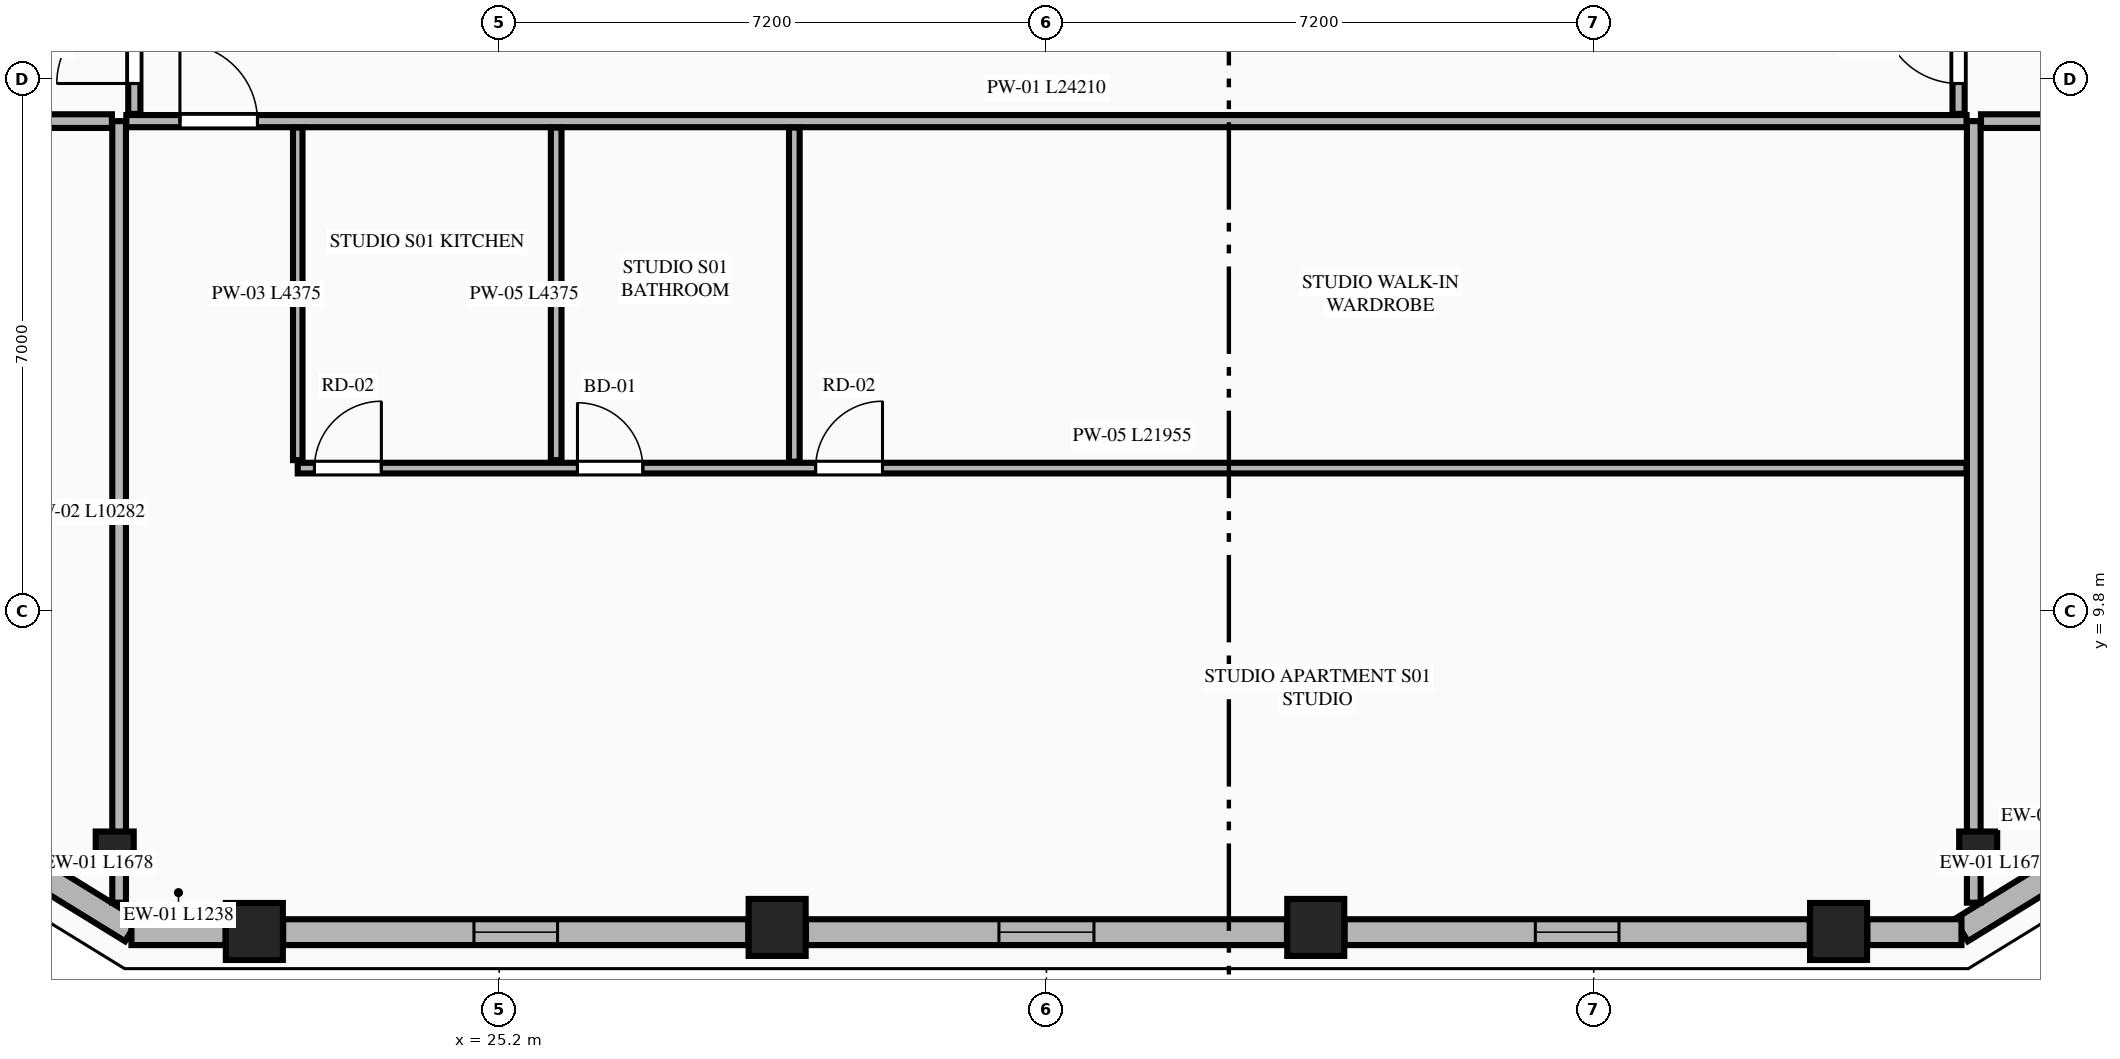
"""IFC4 building model, lengths in metres.
Left out: names, types, materials, properties, quantities, classifications, styles, units other than length and angle.
Written with IfcOpenShell. Run it as: python <this file> out.ifc"""

import sys

from ifc_helpers import new_model, si_unit, direction, frame, frame_2d, origin, origin_2d, place, context, subcontext, project, spatial, rectangle, extrude, element, fill, save


model = new_model("IFC4")
c1 = context("Model", 3, precision=1e-05, world=origin(), true_north=direction((0.0, 1.0)))
c2 = subcontext(c1, "Body", "Model", "MODEL_VIEW")
j1 = project(units=[si_unit("LENGTHUNIT", "METRE"), si_unit("PLANEANGLEUNIT", "RADIAN")], contexts=[c1])
p1 = place(None, origin())
s1 = spatial("IfcSite", under=j1, at=p1, CompositionType="ELEMENT")
p2 = place(p1, origin())
s2 = spatial("IfcBuilding", under=s1, at=p2, CompositionType="ELEMENT")
p3 = place(p2, frame((0.0, 0.0, 214.5)))
s3 = spatial("IfcBuildingStorey", under=s2, at=p3, CompositionType="ELEMENT", Elevation=214.5)
for number, where, z_axis, x_axis in (
    (1, (21.979, 5.589, 0.0), (0.0, 0.0, 1.0), (1.0, 0.0, 0.0)),
    (2, (28.857, 5.642, 0.0), (0.0, 0.0, 1.0), (1.0, 0.0, 0.0)),
    (3, (35.943, 5.642, 0.0), (0.0, 0.0, 1.0), (1.0, 0.0, 0.0)),
    (4, (42.821, 5.589, 0.0), (0.0, 0.0, 1.0), (1.0, 0.0, 0.0)),
):
    element("IfcColumn", number, at=place(p3, frame(where, z_axis=z_axis, x_axis=x_axis)), inside=s3, PredefinedType="COLUMN", context=c2, shape_type="SweptSolid", body=[
        extrude(rectangle(XDim=0.75, YDim=0.75, at=origin_2d()), origin(), (0.0, 0.0, 1.0), 3.55),
    ])
for number, where, z_axis, x_axis in (
    (5, (20.142, 6.654, 0.0), (0.0, 0.0, 1.0), (0.865, -0.501, 0.0)),
    (6, (44.658, 6.654, 0.0), (0.0, 0.0, 1.0), (0.865, 0.501, 0.0)),
):
    element("IfcColumn", number, at=place(p3, frame(where, z_axis=z_axis, x_axis=x_axis)), inside=s3, PredefinedType="PILASTER", context=c2, shape_type="SweptSolid", body=[
        extrude(rectangle(XDim=0.5, YDim=0.35, at=origin_2d()), origin(), (0.0, 0.0, 1.0), 3.55),
    ])
for number, where, z_axis, x_axis in (
    (7, (18.938, 6.484, 0.0), (0.0, 0.0, 1.0), (0.852, -0.524, 0.0)),
    (8, (44.433, 5.605, 0.0), (0.0, 0.0, 1.0), (0.852, 0.524, 0.0)),
):
    element("IfcWall", number, at=place(p3, frame(where, z_axis=z_axis, x_axis=x_axis)), inside=s3, PredefinedType="STANDARD", context=c2, shape_type="SweptSolid", body=[
        extrude(rectangle(XDim=1.678, YDim=0.34, at=frame_2d((0.839, 0.0))), origin(), (0.0, 0.0, 1.0), 3.35),
    ])
p4 = place(p3, frame((20.362, 5.58, 0.0), z_axis=(0.0, 0.0, 1.0), x_axis=(1.0, 0.0, 0.0)))
e9 = element("IfcWall", 9, at=p4, inside=s3, PredefinedType="STANDARD", context=c2, shape_type="SweptSolid", body=[
    extrude(rectangle(XDim=1.238, YDim=0.34, at=frame_2d((0.619, 0.0))), origin(), (0.0, 0.0, 1.0), 3.35),
])
p5 = place(p3, frame((22.358, 5.58, 0.0), z_axis=(0.0, 0.0, 1.0), x_axis=(1.0, 0.0, 0.0)))
e10 = element("IfcWall", 10, at=p5, inside=s3, PredefinedType="STANDARD", context=c2, shape_type="SweptSolid", body=[
    extrude(rectangle(XDim=6.12, YDim=0.34, at=frame_2d((3.06, 0.0))), origin(), (0.0, 0.0, 1.0), 2.883),
])
p6 = place(p5, frame((2.51, 0.0, 0.75)))
e11 = element("IfcOpeningElement", 11, at=p6, cuts=e10, PredefinedType="OPENING", context=c2, shape_type="SweptSolid", body=[
    extrude(rectangle(XDim=1.1, YDim=1.983, at=frame_2d((0.55, 0.991))), frame((0.0, 0.18, 0.0), z_axis=(0.0, -1.0, 0.0), x_axis=(1.0, 0.0, 0.0)), (0.0, 0.0, 1.0), 0.36),
])
p7 = place(p3, frame((29.236, 5.58, 0.0), z_axis=(0.0, 0.0, 1.0), x_axis=(1.0, 0.0, 0.0)))
e12 = element("IfcWall", 12, at=p7, inside=s3, PredefinedType="STANDARD", context=c2, shape_type="SweptSolid", body=[
    extrude(rectangle(XDim=6.328, YDim=0.34, at=frame_2d((3.164, 0.0))), origin(), (0.0, 0.0, 1.0), 2.883),
])
p8 = place(p7, frame((2.539, 0.0, 0.75)))
e13 = element("IfcOpeningElement", 13, at=p8, cuts=e12, PredefinedType="OPENING", context=c2, shape_type="SweptSolid", body=[
    extrude(rectangle(XDim=1.25, YDim=1.95, at=frame_2d((0.625, 0.975))), frame((0.0, 0.18, 0.0), z_axis=(0.0, -1.0, 0.0), x_axis=(1.0, 0.0, 0.0)), (0.0, 0.0, 1.0), 0.36),
])
p9 = place(p3, frame((36.322, 5.58, 0.0), z_axis=(0.0, 0.0, 1.0), x_axis=(1.0, 0.0, 0.0)))
e14 = element("IfcWall", 14, at=p9, inside=s3, PredefinedType="STANDARD", context=c2, shape_type="SweptSolid", body=[
    extrude(rectangle(XDim=6.12, YDim=0.34, at=frame_2d((3.06, 0.0))), origin(), (0.0, 0.0, 1.0), 2.883),
])
p10 = place(p9, frame((2.51, 0.0, 0.75)))
e15 = element("IfcOpeningElement", 15, at=p10, cuts=e14, PredefinedType="OPENING", context=c2, shape_type="SweptSolid", body=[
    extrude(rectangle(XDim=1.1, YDim=1.983, at=frame_2d((0.55, 0.991))), frame((0.0, 0.18, 0.0), z_axis=(0.0, -1.0, 0.0), x_axis=(1.0, 0.0, 0.0)), (0.0, 0.0, 1.0), 0.36),
])
p11 = place(p3, frame((43.2, 5.58, 0.0), z_axis=(0.0, 0.0, 1.0), x_axis=(1.0, 0.0, 0.0)))
e16 = element("IfcWall", 16, at=p11, inside=s3, PredefinedType="STANDARD", context=c2, shape_type="SweptSolid", body=[
    extrude(rectangle(XDim=1.238, YDim=0.34, at=frame_2d((0.619, 0.0))), origin(), (0.0, 0.0, 1.0), 3.35),
])
for number, where, z_axis, x_axis in (
    (17, (20.2, 5.968, 0.0), (0.0, 0.0, 1.0), (0.0, 1.0, 0.0)),
    (18, (44.6, 5.968, 0.0), (0.0, 0.0, 1.0), (0.0, 1.0, 0.0)),
):
    element("IfcWall", number, at=place(p3, frame(where, z_axis=z_axis, x_axis=x_axis)), inside=s3, PredefinedType="PARTITIONING", context=c2, shape_type="SweptSolid", body=[
        extrude(rectangle(XDim=10.282, YDim=0.18, at=frame_2d((5.141, 0.0))), origin(), (0.0, 0.0, 1.0), 3.35),
    ])
p12 = place(p3, frame((20.295, 16.25, 0.0), z_axis=(0.0, 0.0, 1.0), x_axis=(1.0, 0.0, 0.0)))
e19 = element("IfcWall", 19, at=p12, inside=s3, PredefinedType="PARTITIONING", context=c2, shape_type="SweptSolid", body=[
    extrude(rectangle(XDim=24.21, YDim=0.16, at=frame_2d((12.105, 0.0))), origin(), (0.0, 0.0, 1.0), 3.35),
])
p13 = place(p12, frame((0.705, 0.0, 0.0)))
e20 = element("IfcOpeningElement", 20, at=p13, cuts=e19, PredefinedType="OPENING", context=c2, shape_type="SweptSolid", body=[
    extrude(rectangle(XDim=1.02, YDim=2.25, at=frame_2d((0.51, 1.125))), frame((0.0, 0.09, 0.0), z_axis=(0.0, -1.0, 0.0), x_axis=(1.0, 0.0, 0.0)), (0.0, 0.0, 1.0), 0.18),
])
p14 = place(p3, frame((22.55, 11.79, 0.0), z_axis=(0.0, 0.0, 1.0), x_axis=(0.0, 1.0, 0.0)))
e21 = element("IfcWall", 21, at=p14, inside=s3, PredefinedType="PARTITIONING", context=c2, shape_type="SweptSolid", body=[
    extrude(rectangle(XDim=4.375, YDim=0.125, at=frame_2d((2.188, 0.0))), origin(), (0.0, 0.0, 1.0), 2.807),
])
p15 = place(p3, frame((22.55, 11.685, 0.0), z_axis=(0.0, 0.0, 1.0), x_axis=(1.0, 0.0, 0.0)))
e22 = element("IfcWall", 22, at=p15, inside=s3, PredefinedType="PLUMBINGWALL", context=c2, shape_type="SweptSolid", body=[
    extrude(rectangle(XDim=21.955, YDim=0.14, at=frame_2d((10.978, 0.0))), origin(), (0.0, 0.0, 1.0), 3.35),
])
p16 = place(p15, frame((3.68, 0.0, 0.0)))
e23 = element("IfcOpeningElement", 23, at=p16, cuts=e22, PredefinedType="OPENING", context=c2, shape_type="SweptSolid", body=[
    extrude(rectangle(XDim=0.86, YDim=2.1, at=frame_2d((0.43, 1.05))), frame((0.0, 0.08, 0.0), z_axis=(0.0, -1.0, 0.0), x_axis=(1.0, 0.0, 0.0)), (0.0, 0.0, 1.0), 0.16),
])
p17 = place(p15, frame((6.813, 0.0, 0.0)))
e24 = element("IfcOpeningElement", 24, at=p17, cuts=e22, PredefinedType="OPENING", context=c2, shape_type="SweptSolid", body=[
    extrude(rectangle(XDim=0.88, YDim=2.15, at=frame_2d((0.44, 1.075))), frame((0.0, 0.08, 0.0), z_axis=(0.0, -1.0, 0.0), x_axis=(1.0, 0.0, 0.0)), (0.0, 0.0, 1.0), 0.16),
])
p18 = place(p15, frame((0.22, 0.0, 0.0)))
e25 = element("IfcOpeningElement", 25, at=p18, cuts=e22, PredefinedType="OPENING", context=c2, shape_type="SweptSolid", body=[
    extrude(rectangle(XDim=0.88, YDim=2.15, at=frame_2d((0.44, 1.075))), frame((0.0, 0.08, 0.0), z_axis=(0.0, -1.0, 0.0), x_axis=(1.0, 0.0, 0.0)), (0.0, 0.0, 1.0), 0.16),
])
p19 = place(p3, frame((25.95, 11.79, 0.0), z_axis=(0.0, 0.0, 1.0), x_axis=(0.0, 1.0, 0.0)))
e26 = element("IfcWall", 26, at=p19, inside=s3, PredefinedType="PLUMBINGWALL", context=c2, shape_type="SweptSolid", body=[
    extrude(rectangle(XDim=4.375, YDim=0.14, at=frame_2d((2.188, 0.0))), origin(), (0.0, 0.0, 1.0), 3.35),
])
p20 = place(p3, frame((29.083, 11.77, 0.0), z_axis=(0.0, 0.0, 1.0), x_axis=(0.0, 1.0, 0.0)))
e27 = element("IfcWall", 27, at=p20, inside=s3, PredefinedType="PLUMBINGWALL", context=c2, shape_type="SweptSolid", body=[
    extrude(rectangle(XDim=4.395, YDim=0.14, at=frame_2d((2.198, 0.0))), origin(), (0.0, 0.0, 1.0), 3.35),
])
for number, where, z_axis, x_axis in (
    (28, (14.211, 16.25, 0.0), (0.0, 0.0, 1.0), (1.0, 0.0, 0.0)),
    (29, (44.695, 16.25, 0.0), (0.0, 0.0, 1.0), (1.0, 0.0, 0.0)),
):
    element("IfcWall", number, at=place(p3, frame(where, z_axis=z_axis, x_axis=x_axis)), inside=s3, PredefinedType="PARTITIONING", context=c2, shape_type="SweptSolid", body=[
        extrude(rectangle(XDim=5.894, YDim=0.18, at=frame_2d((2.947, 0.0))), origin(), (0.0, 0.0, 1.0), 3.35),
    ])
p21 = place(p3, frame((20.4, 16.345, 0.0), z_axis=(0.0, 0.0, 1.0), x_axis=(0.0, 1.0, 0.0)))
e30 = element("IfcWall", 30, at=p21, inside=s3, PredefinedType="PARTITIONING", context=c2, shape_type="SweptSolid", body=[
    extrude(rectangle(XDim=8.882, YDim=0.16, at=frame_2d((4.441, 0.0))), origin(), (0.0, 0.0, 1.0), 3.35),
])
p22 = place(p21, frame((0.4, 0.0, 0.0)))
e31 = element("IfcOpeningElement", 31, at=p22, cuts=e30, PredefinedType="OPENING", context=c2, shape_type="SweptSolid", body=[
    extrude(rectangle(XDim=1.02, YDim=2.25, at=frame_2d((0.51, 1.125))), frame((0.0, 0.09, 0.0), z_axis=(0.0, -1.0, 0.0), x_axis=(1.0, 0.0, 0.0)), (0.0, 0.0, 1.0), 0.18),
])
p23 = place(p3, frame((44.4, 16.345, 0.0), z_axis=(0.0, 0.0, 1.0), x_axis=(0.0, 1.0, 0.0)))
e32 = element("IfcWall", 32, at=p23, inside=s3, PredefinedType="PARTITIONING", context=c2, shape_type="SweptSolid", body=[
    extrude(rectangle(XDim=9.638, YDim=0.16, at=frame_2d((4.819, 0.0))), origin(), (0.0, 0.0, 1.0), 3.35),
])
p24 = place(p23, frame((0.4, 0.0, 0.0)))
e33 = element("IfcOpeningElement", 33, at=p24, cuts=e32, PredefinedType="OPENING", context=c2, shape_type="SweptSolid", body=[
    extrude(rectangle(XDim=1.02, YDim=2.25, at=frame_2d((0.51, 1.125))), frame((0.0, 0.09, 0.0), z_axis=(0.0, -1.0, 0.0), x_axis=(1.0, 0.0, 0.0)), (0.0, 0.0, 1.0), 0.18),
])
p25 = place(p6, origin())
e34 = element("IfcWindow", 34, at=p25, inside=s3, PartitioningType="SINGLE_PANEL", PredefinedType="WINDOW", context=c2, shape_type="SweptSolid", body=[
    extrude(rectangle(XDim=1.1, YDim=1.983, at=frame_2d((0.55, 0.991))), frame((0.0, 0.03, 0.0), z_axis=(0.0, -1.0, 0.0), x_axis=(1.0, 0.0, 0.0)), (0.0, 0.0, 1.0), 0.06),
])
fill(e11, e34)
p26 = place(p8, origin())
e35 = element("IfcWindow", 35, at=p26, inside=s3, PartitioningType="SINGLE_PANEL", PredefinedType="WINDOW", context=c2, shape_type="SweptSolid", body=[
    extrude(rectangle(XDim=1.25, YDim=1.95, at=frame_2d((0.625, 0.975))), frame((0.0, 0.03, 0.0), z_axis=(0.0, -1.0, 0.0), x_axis=(1.0, 0.0, 0.0)), (0.0, 0.0, 1.0), 0.06),
])
fill(e13, e35)
p27 = place(p10, origin())
e36 = element("IfcWindow", 36, at=p27, inside=s3, PartitioningType="SINGLE_PANEL", PredefinedType="WINDOW", context=c2, shape_type="SweptSolid", body=[
    extrude(rectangle(XDim=1.1, YDim=1.983, at=frame_2d((0.55, 0.991))), frame((0.0, 0.03, 0.0), z_axis=(0.0, -1.0, 0.0), x_axis=(1.0, 0.0, 0.0)), (0.0, 0.0, 1.0), 0.06),
])
fill(e15, e36)
p28 = place(p16, origin())
e37 = element("IfcDoor", 37, at=p28, inside=s3, OperationType="SINGLE_SWING_LEFT", PredefinedType="DOOR", context=c2, shape_type="SweptSolid", body=[
    extrude(rectangle(XDim=0.86, YDim=2.1, at=frame_2d((0.43, 1.05))), frame((0.0, 0.025, 0.0), z_axis=(0.0, -1.0, 0.0), x_axis=(1.0, 0.0, 0.0)), (0.0, 0.0, 1.0), 0.05),
])
fill(e23, e37)
p29 = place(p17, origin())
e38 = element("IfcDoor", 38, at=p29, inside=s3, OperationType="SINGLE_SWING_RIGHT", PredefinedType="DOOR", context=c2, shape_type="SweptSolid", body=[
    extrude(rectangle(XDim=0.88, YDim=2.15, at=frame_2d((0.44, 1.075))), frame((0.0, 0.025, 0.0), z_axis=(0.0, -1.0, 0.0), x_axis=(1.0, 0.0, 0.0)), (0.0, 0.0, 1.0), 0.05),
])
fill(e24, e38)
p30 = place(p13, origin())
e39 = element("IfcDoor", 39, at=p30, inside=s3, OperationType="SINGLE_SWING_LEFT", PredefinedType="DOOR", context=c2, shape_type="SweptSolid", body=[
    extrude(rectangle(XDim=1.02, YDim=2.25, at=frame_2d((0.51, 1.125))), frame((0.0, 0.025, 0.0), z_axis=(0.0, -1.0, 0.0), x_axis=(1.0, 0.0, 0.0)), (0.0, 0.0, 1.0), 0.05),
])
fill(e20, e39)
p31 = place(p18, origin())
e40 = element("IfcDoor", 40, at=p31, inside=s3, OperationType="SINGLE_SWING_RIGHT", PredefinedType="DOOR", context=c2, shape_type="SweptSolid", body=[
    extrude(rectangle(XDim=0.88, YDim=2.15, at=frame_2d((0.44, 1.075))), frame((0.0, 0.025, 0.0), z_axis=(0.0, -1.0, 0.0), x_axis=(1.0, 0.0, 0.0)), (0.0, 0.0, 1.0), 0.05),
])
fill(e25, e40)
p32 = place(p22, origin())
e41 = element("IfcDoor", 41, at=p32, inside=s3, OperationType="SINGLE_SWING_LEFT", PredefinedType="DOOR", context=c2, shape_type="SweptSolid", body=[
    extrude(rectangle(XDim=1.02, YDim=2.25, at=frame_2d((0.51, 1.125))), frame((0.0, 0.025, 0.0), z_axis=(0.0, -1.0, 0.0), x_axis=(1.0, 0.0, 0.0)), (0.0, 0.0, 1.0), 0.05),
])
fill(e31, e41)
p33 = place(p24, origin())
e42 = element("IfcDoor", 42, at=p33, inside=s3, OperationType="SINGLE_SWING_RIGHT", PredefinedType="DOOR", context=c2, shape_type="SweptSolid", body=[
    extrude(rectangle(XDim=1.02, YDim=2.25, at=frame_2d((0.51, 1.125))), frame((0.0, 0.025, 0.0), z_axis=(0.0, -1.0, 0.0), x_axis=(1.0, 0.0, 0.0)), (0.0, 0.0, 1.0), 0.05),
])
fill(e33, e42)
save(model, sys.argv[1])
